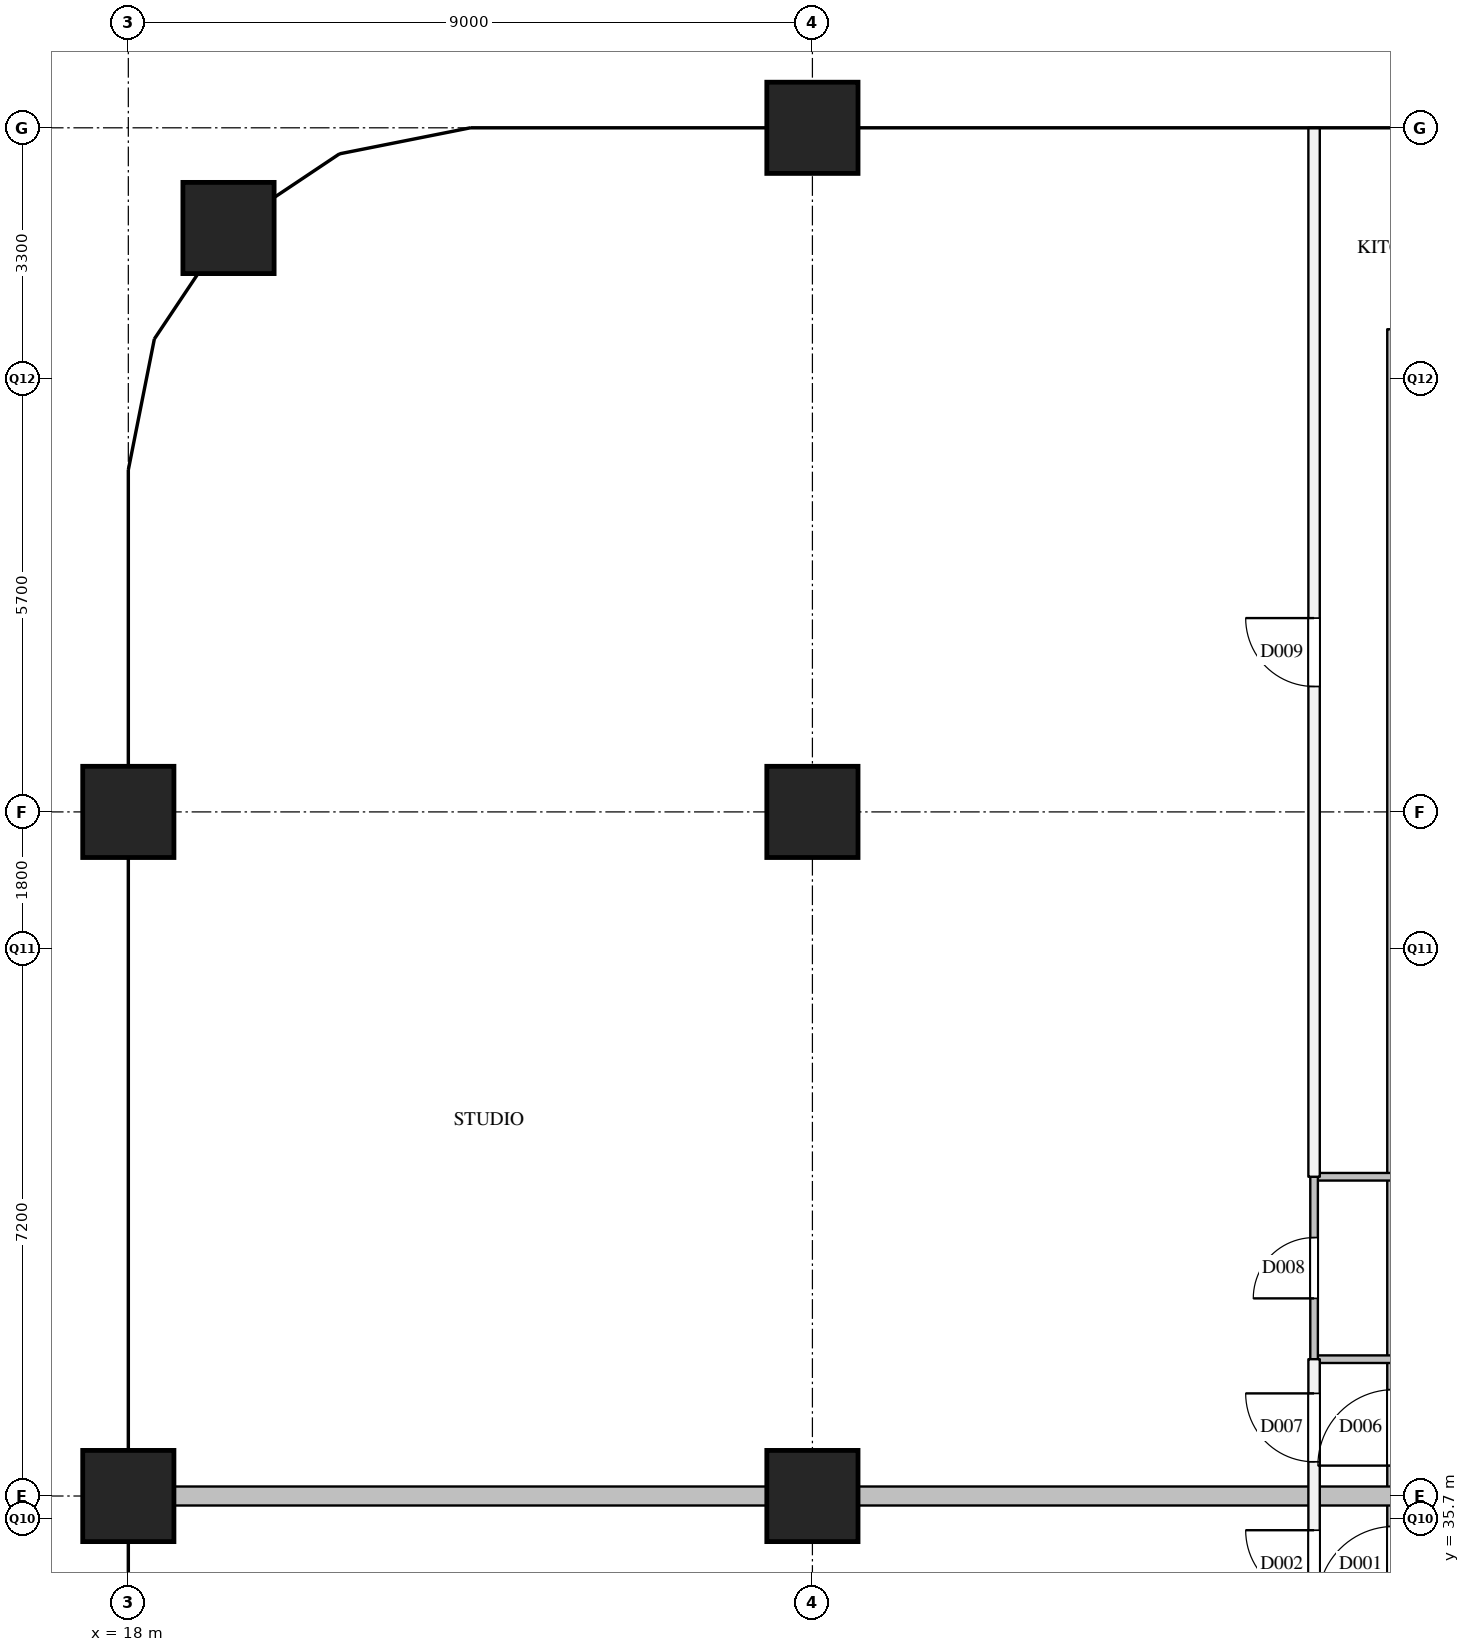
"""IFC4 building model, lengths in metres.
Left out: names, types, materials, properties, quantities, classifications, styles, units other than length and angle.
Written with IfcOpenShell. Run it as: python <this file> out.ifc"""

import sys

from ifc_helpers import new_model, si_unit, direction, frame, frame_2d, origin, origin_2d, place, context, subcontext, project, spatial, rectangle, extrude, element, fill, save


model = new_model("IFC4")
c1 = context("Model", 3, precision=1e-05, world=origin(), true_north=direction((0.0, 1.0)))
c2 = subcontext(c1, "Body", "Model", "MODEL_VIEW")
j1 = project(units=[si_unit("LENGTHUNIT", "METRE"), si_unit("PLANEANGLEUNIT", "RADIAN")], contexts=[c1])
p1 = place(None, origin())
s1 = spatial("IfcSite", under=j1, at=p1, CompositionType="ELEMENT")
p2 = place(p1, origin())
s2 = spatial("IfcBuilding", under=s1, at=p2, CompositionType="ELEMENT")
p3 = place(p2, frame((0.0, 0.0, 269.6)))
s3 = spatial("IfcBuildingStorey", under=s2, at=p3, CompositionType="ELEMENT", Elevation=269.6)
for number, where, z_axis, x_axis in (
    (1, (18.0, 36.0, 0.0), (0.0, 0.0, 1.0), (1.0, 0.0, 0.0)),
    (2, (18.0, 45.0, 0.0), (0.0, 0.0, 1.0), (1.0, 0.0, 0.0)),
    (3, (19.318, 52.682, 0.0), (0.0, 0.0, 1.0), (1.0, 0.0, 0.0)),
    (4, (27.0, 36.0, 0.0), (0.0, 0.0, 1.0), (1.0, 0.0, 0.0)),
    (5, (27.0, 45.0, 0.0), (0.0, 0.0, 1.0), (1.0, 0.0, 0.0)),
    (6, (27.0, 54.0, 0.0), (0.0, 0.0, 1.0), (1.0, 0.0, 0.0)),
):
    element("IfcColumn", number, at=place(p3, frame(where, z_axis=z_axis, x_axis=x_axis)), inside=s3, PredefinedType="COLUMN", context=c2, shape_type="SweptSolid", body=[
        extrude(rectangle(XDim=1.2, YDim=1.2, at=origin_2d()), origin(), (0.0, 0.0, 1.0), 3.9),
    ])
p4 = place(p3, frame((34.65, 28.5, 0.0), z_axis=(0.0, 0.0, 1.0), x_axis=(0.0, 1.0, 0.0)))
e7 = element("IfcWall", 7, at=p4, inside=s3, PredefinedType="PARTITIONING", context=c2, shape_type="SweptSolid", body=[
    extrude(rectangle(XDim=22.85, YDim=0.175, at=frame_2d((11.425, 0.0))), origin(), (0.0, 0.0, 1.0), 3.6),
])
p5 = place(p4, frame((6.1, 0.0, 0.0)))
e8 = element("IfcOpeningElement", 8, at=p5, cuts=e7, PredefinedType="OPENING", context=c2, shape_type="SweptSolid", body=[
    extrude(rectangle(XDim=1.0, YDim=2.1, at=frame_2d((0.5, 1.05))), frame((0.0, 0.097, 0.0), z_axis=(0.0, -1.0, 0.0), x_axis=(1.0, 0.0, 0.0)), (0.0, 0.0, 1.0), 0.195),
])
p6 = place(p4, frame((7.9, 0.0, 0.0)))
e9 = element("IfcOpeningElement", 9, at=p6, cuts=e7, PredefinedType="OPENING", context=c2, shape_type="SweptSolid", body=[
    extrude(rectangle(XDim=1.0, YDim=2.1, at=frame_2d((0.5, 1.05))), frame((0.0, 0.097, 0.0), z_axis=(0.0, -1.0, 0.0), x_axis=(1.0, 0.0, 0.0)), (0.0, 0.0, 1.0), 0.195),
])
p7 = place(p3, frame((33.6, 34.2, 0.0), z_axis=(0.0, 0.0, 1.0), x_axis=(0.0, 1.0, 0.0)))
e10 = element("IfcWall", 10, at=p7, inside=s3, PredefinedType="PARTITIONING", context=c2, shape_type="SweptSolid", body=[
    extrude(rectangle(XDim=3.6, YDim=0.15, at=frame_2d((1.8, 0.0))), origin(), (0.0, 0.0, 1.0), 3.6),
])
p8 = place(p7, frame((0.45, 0.0, 0.0)))
e11 = element("IfcOpeningElement", 11, at=p8, cuts=e10, PredefinedType="OPENING", context=c2, shape_type="SweptSolid", body=[
    extrude(rectangle(XDim=0.9, YDim=2.1, at=frame_2d((0.45, 1.05))), frame((0.0, 0.085, 0.0), z_axis=(0.0, -1.0, 0.0), x_axis=(1.0, 0.0, 0.0)), (0.0, 0.0, 1.0), 0.17),
])
p9 = place(p7, frame((2.25, 0.0, 0.0)))
e12 = element("IfcOpeningElement", 12, at=p9, cuts=e10, PredefinedType="OPENING", context=c2, shape_type="SweptSolid", body=[
    extrude(rectangle(XDim=0.9, YDim=2.1, at=frame_2d((0.45, 1.05))), frame((0.0, 0.085, 0.0), z_axis=(0.0, -1.0, 0.0), x_axis=(1.0, 0.0, 0.0)), (0.0, 0.0, 1.0), 0.17),
])
p10 = place(p3, frame((33.6, 40.2, 0.0), z_axis=(0.0, 0.0, 1.0), x_axis=(0.0, 1.0, 0.0)))
e13 = element("IfcWall", 13, at=p10, inside=s3, PredefinedType="PARTITIONING", context=c2, shape_type="SweptSolid", body=[
    extrude(rectangle(XDim=13.8, YDim=0.15, at=frame_2d((6.9, 0.0))), origin(), (0.0, 0.0, 1.0), 2.6),
])
p11 = place(p10, frame((6.45, 0.0, 0.0)))
e14 = element("IfcOpeningElement", 14, at=p11, cuts=e13, PredefinedType="OPENING", context=c2, shape_type="SweptSolid", body=[
    extrude(rectangle(XDim=0.9, YDim=2.1, at=frame_2d((0.45, 1.05))), frame((0.0, 0.085, 0.0), z_axis=(0.0, -1.0, 0.0), x_axis=(1.0, 0.0, 0.0)), (0.0, 0.0, 1.0), 0.17),
])
p12 = place(p3, frame((18.0, 36.0, 0.0), z_axis=(0.0, 0.0, 1.0), x_axis=(1.0, 0.0, 0.0)))
e15 = element("IfcWall", 15, at=p12, inside=s3, PredefinedType="PARTITIONING", context=c2, shape_type="SweptSolid", body=[
    extrude(rectangle(XDim=16.65, YDim=0.25, at=frame_2d((8.325, 0.0))), origin(), (0.0, 0.0, 1.0), 3.6),
])
for number, where, z_axis, x_axis in (
    (16, (33.6, 37.8, 0.0), (0.0, 0.0, 1.0), (1.0, 0.0, 0.0)),
    (17, (33.6, 40.2, 0.0), (0.0, 0.0, 1.0), (1.0, 0.0, 0.0)),
):
    element("IfcWall", number, at=place(p3, frame(where, z_axis=z_axis, x_axis=x_axis)), inside=s3, PredefinedType="PARTITIONING", context=c2, shape_type="SweptSolid", body=[
        extrude(rectangle(XDim=1.05, YDim=0.1, at=frame_2d((0.525, 0.0))), origin(), (0.0, 0.0, 1.0), 3.6),
    ])
p13 = place(p3, frame((33.6, 37.8, 0.0), z_axis=(0.0, 0.0, 1.0), x_axis=(0.0, 1.0, 0.0)))
e18 = element("IfcWall", 18, at=p13, inside=s3, PredefinedType="PARTITIONING", context=c2, shape_type="SweptSolid", body=[
    extrude(rectangle(XDim=2.4, YDim=0.1, at=frame_2d((1.2, 0.0))), origin(), (0.0, 0.0, 1.0), 3.6),
])
p14 = place(p13, frame((0.8, 0.0, 0.0)))
e19 = element("IfcOpeningElement", 19, at=p14, cuts=e18, PredefinedType="OPENING", context=c2, shape_type="SweptSolid", body=[
    extrude(rectangle(XDim=0.8, YDim=2.1, at=frame_2d((0.4, 1.05))), frame((0.0, 0.06, 0.0), z_axis=(0.0, -1.0, 0.0), x_axis=(1.0, 0.0, 0.0)), (0.0, 0.0, 1.0), 0.12),
])
p15 = place(p8, origin())
e20 = element("IfcDoor", 20, at=p15, inside=s3, OperationType="SINGLE_SWING_RIGHT", PredefinedType="DOOR", context=c2, shape_type="SweptSolid", body=[
    extrude(rectangle(XDim=0.9, YDim=2.1, at=frame_2d((0.45, 1.05))), frame((0.0, 0.025, 0.0), z_axis=(0.0, -1.0, 0.0), x_axis=(1.0, 0.0, 0.0)), (0.0, 0.0, 1.0), 0.05),
])
fill(e11, e20)
p16 = place(p9, origin())
e21 = element("IfcDoor", 21, at=p16, inside=s3, OperationType="SINGLE_SWING_RIGHT", PredefinedType="DOOR", context=c2, shape_type="SweptSolid", body=[
    extrude(rectangle(XDim=0.9, YDim=2.1, at=frame_2d((0.45, 1.05))), frame((0.0, 0.025, 0.0), z_axis=(0.0, -1.0, 0.0), x_axis=(1.0, 0.0, 0.0)), (0.0, 0.0, 1.0), 0.05),
])
fill(e12, e21)
p17 = place(p14, origin())
e22 = element("IfcDoor", 22, at=p17, inside=s3, OperationType="SINGLE_SWING_LEFT", PredefinedType="DOOR", context=c2, shape_type="SweptSolid", body=[
    extrude(rectangle(XDim=0.8, YDim=2.1, at=frame_2d((0.4, 1.05))), frame((0.0, 0.025, 0.0), z_axis=(0.0, -1.0, 0.0), x_axis=(1.0, 0.0, 0.0)), (0.0, 0.0, 1.0), 0.05),
])
fill(e19, e22)
p18 = place(p11, origin())
e23 = element("IfcDoor", 23, at=p18, inside=s3, OperationType="SINGLE_SWING_RIGHT", PredefinedType="DOOR", context=c2, shape_type="SweptSolid", body=[
    extrude(rectangle(XDim=0.9, YDim=2.1, at=frame_2d((0.45, 1.05))), frame((0.0, 0.025, 0.0), z_axis=(0.0, -1.0, 0.0), x_axis=(1.0, 0.0, 0.0)), (0.0, 0.0, 1.0), 0.05),
])
fill(e14, e23)
save(model, sys.argv[1])
